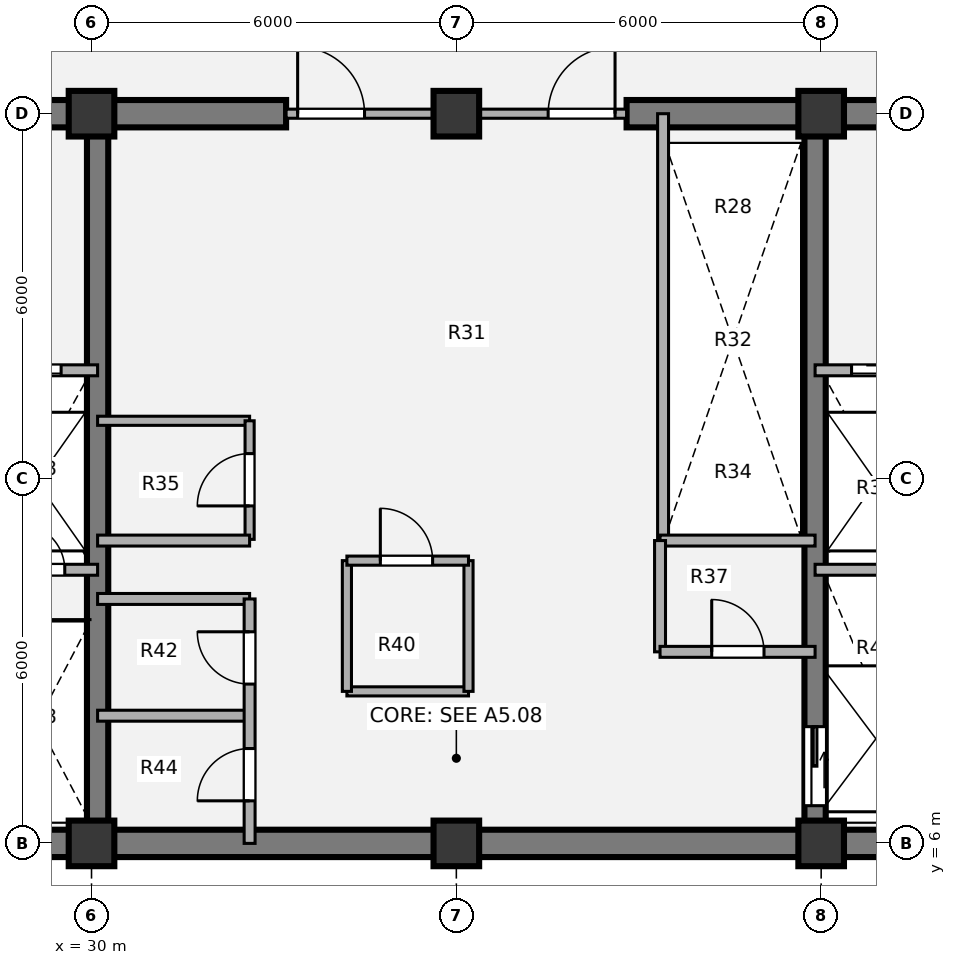
"""IFC4 building model, lengths in metres.
Left out: names, types, materials, properties, quantities, classifications, styles, units other than length and angle.
Written with IfcOpenShell. Run it as: python <this file> out.ifc"""

import sys

from ifc_helpers import new_model, si_unit, direction, frame, frame_2d, origin, origin_2d, place, context, subcontext, project, spatial, rectangle, extrude, source, transform, mapped, element, fill, save


model = new_model("IFC4")
c1 = context("Model", 3, precision=1e-05, world=origin(), true_north=direction((0.0, 1.0)))
c2 = subcontext(c1, "Body", "Model", "MODEL_VIEW")
j1 = project(units=[si_unit("LENGTHUNIT", "METRE"), si_unit("PLANEANGLEUNIT", "RADIAN")], contexts=[c1])
p1 = place(None, origin())
s1 = spatial("IfcSite", under=j1, at=p1, CompositionType="ELEMENT")
p2 = place(p1, origin())
s2 = spatial("IfcBuilding", under=s1, at=p2, CompositionType="ELEMENT")
p3 = place(p2, frame((0.0, 0.0, 167.76)))
s3 = spatial("IfcBuildingStorey", under=s2, at=p3, CompositionType="ELEMENT", Elevation=167.76)
m1 = source(origin(), c2, "Body", "SweptSolid", [
    extrude(rectangle(XDim=0.75, YDim=0.75, at=origin_2d()), origin(), (0.0, 0.0, 1.0), 3.78),
])
for number, where, z_axis, x_axis in (
    (1, (30.0, 6.0, 0.0), (0.0, 0.0, 1.0), (1.0, 0.0, 0.0)),
    (2, (36.0, 6.0, 0.0), (0.0, 0.0, 1.0), (1.0, 0.0, 0.0)),
    (3, (42.0, 6.0, 0.0), (0.0, 0.0, 1.0), (1.0, 0.0, 0.0)),
    (4, (30.0, 18.0, 0.0), (0.0, 0.0, 1.0), (1.0, 0.0, 0.0)),
    (5, (36.0, 18.0, 0.0), (0.0, 0.0, 1.0), (1.0, 0.0, 0.0)),
    (6, (42.0, 18.0, 0.0), (0.0, 0.0, 1.0), (1.0, 0.0, 0.0)),
):
    element("IfcColumn", number, at=place(p3, frame(where, z_axis=z_axis, x_axis=x_axis)), inside=s3, PredefinedType="COLUMN", context=c2, shape_type="MappedRepresentation", body=[
        mapped(m1, transform((0.0, 0.0, 0.0), x_axis=(1.0, 0.0, 0.0), y_axis=(0.0, 1.0, 0.0), z_axis=(0.0, 0.0, 1.0), scale=1.0)),
    ])
p4 = place(p3, frame((48.225, 6.0, 0.0), z_axis=(0.0, 0.0, 1.0), x_axis=(-1.0, 0.0, 0.0)))
e7 = element("IfcWall", 7, at=p4, inside=s3, PredefinedType="SHEAR", context=c2, shape_type="SweptSolid", body=[
    extrude(rectangle(XDim=24.45, YDim=0.45, at=frame_2d((12.225, 0.0))), origin(), (0.0, 0.0, 1.0), 3.78),
])
p5 = place(p3, frame((23.775, 18.0, 0.0), z_axis=(0.0, 0.0, 1.0), x_axis=(1.0, 0.0, 0.0)))
e8 = element("IfcWall", 8, at=p5, inside=s3, PredefinedType="SHEAR", context=c2, shape_type="SweptSolid", body=[
    extrude(rectangle(XDim=9.425, YDim=0.45, at=frame_2d((4.712, 0.0))), origin(), (0.0, 0.0, 1.0), 3.78),
])
p6 = place(p5, frame((2.95, 0.0, 0.0)))
e9 = element("IfcOpeningElement", 9, at=p6, cuts=e8, PredefinedType="OPENING", context=c2, shape_type="SweptSolid", body=[
    extrude(rectangle(XDim=1.1, YDim=2.1, at=origin_2d()), frame((0.55, 0.235, 1.05), z_axis=(0.0, -1.0, 0.0), x_axis=(1.0, 0.0, 0.0)), (0.0, 0.0, 1.0), 0.47),
])
p7 = place(p3, frame((38.8, 18.0, 0.0), z_axis=(0.0, 0.0, 1.0), x_axis=(1.0, 0.0, 0.0)))
e10 = element("IfcWall", 10, at=p7, inside=s3, PredefinedType="SHEAR", context=c2, shape_type="SweptSolid", body=[
    extrude(rectangle(XDim=9.425, YDim=0.45, at=frame_2d((4.712, 0.0))), origin(), (0.0, 0.0, 1.0), 3.78),
])
p8 = place(p7, frame((5.45, 0.0, 0.0)))
e11 = element("IfcOpeningElement", 11, at=p8, cuts=e10, PredefinedType="OPENING", context=c2, shape_type="SweptSolid", body=[
    extrude(rectangle(XDim=1.1, YDim=2.1, at=origin_2d()), frame((0.55, 0.235, 1.05), z_axis=(0.0, -1.0, 0.0), x_axis=(1.0, 0.0, 0.0)), (0.0, 0.0, 1.0), 0.47),
])
p9 = place(p3, frame((30.1, 6.0, 0.0), z_axis=(0.0, 0.0, 1.0), x_axis=(0.0, 1.0, 0.0)))
e12 = element("IfcWall", 12, at=p9, inside=s3, PredefinedType="SHEAR", context=c2, shape_type="SweptSolid", body=[
    extrude(rectangle(XDim=12.0, YDim=0.35, at=frame_2d((6.0, 0.0))), origin(), (0.0, 0.0, 1.0), 3.78),
])
p10 = place(p3, frame((41.9, 18.0, 0.0), z_axis=(0.0, 0.0, 1.0), x_axis=(0.0, -1.0, 0.0)))
e13 = element("IfcWall", 13, at=p10, inside=s3, PredefinedType="SHEAR", context=c2, shape_type="SweptSolid", body=[
    extrude(rectangle(XDim=12.0, YDim=0.35, at=frame_2d((6.0, 0.0))), origin(), (0.0, 0.0, 1.0), 3.78),
])
p11 = place(p10, frame((10.08, 0.0, 0.0)))
e14 = element("IfcOpeningElement", 14, at=p11, cuts=e13, PredefinedType="OPENING", context=c2, shape_type="SweptSolid", body=[
    extrude(rectangle(XDim=1.3, YDim=2.1, at=origin_2d()), frame((0.65, 0.185, 1.05), z_axis=(0.0, -1.0, 0.0), x_axis=(1.0, 0.0, 0.0)), (0.0, 0.0, 1.0), 0.37),
])
p12 = place(p3, frame((30.1, 12.95, 0.0), z_axis=(0.0, 0.0, 1.0), x_axis=(1.0, 0.0, 0.0)))
e15 = element("IfcWall", 15, at=p12, inside=s3, PredefinedType="PARTITIONING", context=c2, shape_type="SweptSolid", body=[
    extrude(rectangle(XDim=2.5, YDim=0.15, at=frame_2d((1.25, 0.0))), origin(), (0.0, 0.0, 1.0), 3.5),
])
p13 = place(p3, frame((32.6, 11.0, 0.0), z_axis=(0.0, 0.0, 1.0), x_axis=(0.0, 1.0, 0.0)))
e16 = element("IfcWall", 16, at=p13, inside=s3, PredefinedType="PARTITIONING", context=c2, shape_type="SweptSolid", body=[
    extrude(rectangle(XDim=1.95, YDim=0.15, at=frame_2d((0.975, 0.0))), origin(), (0.0, 0.0, 1.0), 3.5),
])
p14 = place(p13, frame((0.55, 0.0, 0.0)))
e17 = element("IfcOpeningElement", 17, at=p14, cuts=e16, PredefinedType="OPENING", context=c2, shape_type="SweptSolid", body=[
    extrude(rectangle(XDim=0.86, YDim=2.1, at=origin_2d()), frame((0.43, 0.085, 1.05), z_axis=(0.0, -1.0, 0.0), x_axis=(1.0, 0.0, 0.0)), (0.0, 0.0, 1.0), 0.17),
])
p15 = place(p3, frame((34.2, 8.5, 0.0), z_axis=(0.0, 0.0, 1.0), x_axis=(1.0, 0.0, 0.0)))
e18 = element("IfcWall", 18, at=p15, inside=s3, PredefinedType="PARTITIONING", context=c2, shape_type="SweptSolid", body=[
    extrude(rectangle(XDim=2.0, YDim=0.15, at=frame_2d((1.0, 0.0))), origin(), (0.0, 0.0, 1.0), 3.5),
])
p16 = place(p3, frame((34.2, 8.5, 0.0), z_axis=(0.0, 0.0, 1.0), x_axis=(0.0, 1.0, 0.0)))
e19 = element("IfcWall", 19, at=p16, inside=s3, PredefinedType="PARTITIONING", context=c2, shape_type="SweptSolid", body=[
    extrude(rectangle(XDim=2.15, YDim=0.15, at=frame_2d((1.075, 0.0))), origin(), (0.0, 0.0, 1.0), 3.5),
])
p17 = place(p3, frame((36.2, 8.5, 0.0), z_axis=(0.0, 0.0, 1.0), x_axis=(0.0, 1.0, 0.0)))
e20 = element("IfcWall", 20, at=p17, inside=s3, PredefinedType="PARTITIONING", context=c2, shape_type="SweptSolid", body=[
    extrude(rectangle(XDim=2.15, YDim=0.15, at=frame_2d((1.075, 0.0))), origin(), (0.0, 0.0, 1.0), 2.715),
])
p18 = place(p3, frame((34.2, 10.65, 0.0), z_axis=(0.0, 0.0, 1.0), x_axis=(1.0, 0.0, 0.0)))
e21 = element("IfcWall", 21, at=p18, inside=s3, PredefinedType="PARTITIONING", context=c2, shape_type="SweptSolid", body=[
    extrude(rectangle(XDim=2.0, YDim=0.15, at=frame_2d((1.0, 0.0))), origin(), (0.0, 0.0, 1.0), 3.5),
])
p19 = place(p18, frame((0.55, 0.0, 0.0)))
e22 = element("IfcOpeningElement", 22, at=p19, cuts=e21, PredefinedType="OPENING", context=c2, shape_type="SweptSolid", body=[
    extrude(rectangle(XDim=0.86, YDim=2.1, at=origin_2d()), frame((0.43, 0.085, 1.05), z_axis=(0.0, -1.0, 0.0), x_axis=(1.0, 0.0, 0.0)), (0.0, 0.0, 1.0), 0.17),
])
p20 = place(p3, frame((39.4, 11.0, 0.0), z_axis=(0.0, 0.0, 1.0), x_axis=(0.0, 1.0, 0.0)))
e23 = element("IfcWall", 23, at=p20, inside=s3, PredefinedType="PARTITIONING", context=c2, shape_type="SweptSolid", body=[
    extrude(rectangle(XDim=7.0, YDim=0.18, at=frame_2d((3.5, 0.0))), origin(), (0.0, 0.0, 1.0), 3.5),
])
p21 = place(p3, frame((30.1, 10.98, 0.0), z_axis=(0.0, 0.0, 1.0), x_axis=(1.0, 0.0, 0.0)))
e24 = element("IfcWall", 24, at=p21, inside=s3, PredefinedType="PARTITIONING", context=c2, shape_type="SweptSolid", body=[
    extrude(rectangle(XDim=2.5, YDim=0.18, at=frame_2d((1.25, 0.0))), origin(), (0.0, 0.0, 1.0), 3.5),
])
p22 = place(p3, frame((39.35, 10.98, 0.0), z_axis=(0.0, 0.0, 1.0), x_axis=(1.0, 0.0, 0.0)))
e25 = element("IfcWall", 25, at=p22, inside=s3, PredefinedType="PARTITIONING", context=c2, shape_type="SweptSolid", body=[
    extrude(rectangle(XDim=2.55, YDim=0.18, at=frame_2d((1.275, 0.0))), origin(), (0.0, 0.0, 1.0), 3.5),
])
for number, where, z_axis, x_axis in (
    (26, (30.1, 8.1, 0.0), (0.0, 0.0, 1.0), (1.0, 0.0, 0.0)),
    (27, (30.1, 10.02, 0.0), (0.0, 0.0, 1.0), (1.0, 0.0, 0.0)),
):
    element("IfcWall", number, at=place(p3, frame(where, z_axis=z_axis, x_axis=x_axis)), inside=s3, PredefinedType="PARTITIONING", context=c2, shape_type="SweptSolid", body=[
        extrude(rectangle(XDim=2.5, YDim=0.18, at=frame_2d((1.25, 0.0))), origin(), (0.0, 0.0, 1.0), 3.5),
    ])
p23 = place(p3, frame((32.6, 6.0, 0.0), z_axis=(0.0, 0.0, 1.0), x_axis=(0.0, 1.0, 0.0)))
e28 = element("IfcWall", 28, at=p23, inside=s3, PredefinedType="PARTITIONING", context=c2, shape_type="SweptSolid", body=[
    extrude(rectangle(XDim=4.02, YDim=0.18, at=frame_2d((2.01, 0.0))), origin(), (0.0, 0.0, 1.0), 3.5),
])
p24 = place(p23, frame((0.7, 0.0, 0.0)))
e29 = element("IfcOpeningElement", 29, at=p24, cuts=e28, PredefinedType="OPENING", context=c2, shape_type="SweptSolid", body=[
    extrude(rectangle(XDim=0.86, YDim=2.1, at=origin_2d()), frame((0.43, 0.1, 1.05), z_axis=(0.0, -1.0, 0.0), x_axis=(1.0, 0.0, 0.0)), (0.0, 0.0, 1.0), 0.2),
])
p25 = place(p23, frame((2.62, 0.0, 0.0)))
e30 = element("IfcOpeningElement", 30, at=p25, cuts=e28, PredefinedType="OPENING", context=c2, shape_type="SweptSolid", body=[
    extrude(rectangle(XDim=0.86, YDim=2.1, at=origin_2d()), frame((0.43, 0.1, 1.05), z_axis=(0.0, -1.0, 0.0), x_axis=(1.0, 0.0, 0.0)), (0.0, 0.0, 1.0), 0.2),
])
p26 = place(p3, frame((39.35, 9.15, 0.0), z_axis=(0.0, 0.0, 1.0), x_axis=(0.0, 1.0, 0.0)))
e31 = element("IfcWall", 31, at=p26, inside=s3, PredefinedType="PARTITIONING", context=c2, shape_type="SweptSolid", body=[
    extrude(rectangle(XDim=1.83, YDim=0.18, at=frame_2d((0.915, 0.0))), origin(), (0.0, 0.0, 1.0), 3.5),
])
p27 = place(p3, frame((39.35, 9.15, 0.0), z_axis=(0.0, 0.0, 1.0), x_axis=(1.0, 0.0, 0.0)))
e32 = element("IfcWall", 32, at=p27, inside=s3, PredefinedType="PARTITIONING", context=c2, shape_type="SweptSolid", body=[
    extrude(rectangle(XDim=2.55, YDim=0.18, at=frame_2d((1.275, 0.0))), origin(), (0.0, 0.0, 1.0), 3.5),
])
p28 = place(p27, frame((0.85, 0.0, 0.0)))
e33 = element("IfcOpeningElement", 33, at=p28, cuts=e32, PredefinedType="OPENING", context=c2, shape_type="SweptSolid", body=[
    extrude(rectangle(XDim=0.86, YDim=2.1, at=origin_2d()), frame((0.43, 0.1, 1.05), z_axis=(0.0, -1.0, 0.0), x_axis=(1.0, 0.0, 0.0)), (0.0, 0.0, 1.0), 0.2),
])
p29 = place(p3, frame((33.2, 18.0, 0.0), z_axis=(0.0, 0.0, 1.0), x_axis=(1.0, 0.0, 0.0)))
e34 = element("IfcWall", 34, at=p29, inside=s3, PredefinedType="PARTITIONING", context=c2, shape_type="SweptSolid", body=[
    extrude(rectangle(XDim=5.6, YDim=0.15, at=frame_2d((2.8, 0.0))), origin(), (0.0, 0.0, 1.0), 2.515),
])
p30 = place(p29, frame((0.19, 0.0, 0.0)))
e35 = element("IfcOpeningElement", 35, at=p30, cuts=e34, PredefinedType="OPENING", context=c2, shape_type="SweptSolid", body=[
    extrude(rectangle(XDim=1.1, YDim=2.1, at=origin_2d()), frame((0.55, 0.085, 1.05), z_axis=(0.0, -1.0, 0.0), x_axis=(1.0, 0.0, 0.0)), (0.0, 0.0, 1.0), 0.17),
])
p31 = place(p29, frame((4.31, 0.0, 0.0)))
e36 = element("IfcOpeningElement", 36, at=p31, cuts=e34, PredefinedType="OPENING", context=c2, shape_type="SweptSolid", body=[
    extrude(rectangle(XDim=1.1, YDim=2.1, at=origin_2d()), frame((0.55, 0.085, 1.05), z_axis=(0.0, -1.0, 0.0), x_axis=(1.0, 0.0, 0.0)), (0.0, 0.0, 1.0), 0.17),
])
p32 = place(p3, frame((24.0, 13.78, 0.0), z_axis=(0.0, 0.0, 1.0), x_axis=(1.0, 0.0, 0.0)))
e37 = element("IfcWall", 37, at=p32, inside=s3, PredefinedType="PARTITIONING", context=c2, shape_type="SweptSolid", body=[
    extrude(rectangle(XDim=6.1, YDim=0.18, at=frame_2d((3.05, 0.0))), origin(), (0.0, 0.0, 1.0), 3.5),
])
p33 = place(p32, frame((1.15, 0.0, 0.0)))
e38 = element("IfcOpeningElement", 38, at=p33, cuts=e37, PredefinedType="OPENING", context=c2, shape_type="SweptSolid", body=[
    extrude(rectangle(XDim=1.1, YDim=2.1, at=origin_2d()), frame((0.55, 0.1, 1.05), z_axis=(0.0, -1.0, 0.0), x_axis=(1.0, 0.0, 0.0)), (0.0, 0.0, 1.0), 0.2),
])
p34 = place(p32, frame((4.4, 0.0, 0.0)))
e39 = element("IfcOpeningElement", 39, at=p34, cuts=e37, PredefinedType="OPENING", context=c2, shape_type="SweptSolid", body=[
    extrude(rectangle(XDim=1.1, YDim=2.1, at=origin_2d()), frame((0.55, 0.1, 1.05), z_axis=(0.0, -1.0, 0.0), x_axis=(1.0, 0.0, 0.0)), (0.0, 0.0, 1.0), 0.2),
])
p35 = place(p3, frame((28.15, 10.5, 0.0), z_axis=(0.0, 0.0, 1.0), x_axis=(1.0, 0.0, 0.0)))
e40 = element("IfcWall", 40, at=p35, inside=s3, PredefinedType="PARTITIONING", context=c2, shape_type="SweptSolid", body=[
    extrude(rectangle(XDim=1.95, YDim=0.18, at=frame_2d((0.975, 0.0))), origin(), (0.0, 0.0, 1.0), 3.5),
])
p36 = place(p35, frame((0.65, 0.0, 0.0)))
e41 = element("IfcOpeningElement", 41, at=p36, cuts=e40, PredefinedType="OPENING", context=c2, shape_type="SweptSolid", body=[
    extrude(rectangle(XDim=0.76, YDim=2.05, at=origin_2d()), frame((0.38, 0.1, 1.025), z_axis=(0.0, -1.0, 0.0), x_axis=(1.0, 0.0, 0.0)), (0.0, 0.0, 1.0), 0.2),
])
p37 = place(p3, frame((41.9, 13.78, 0.0), z_axis=(0.0, 0.0, 1.0), x_axis=(1.0, 0.0, 0.0)))
e42 = element("IfcWall", 42, at=p37, inside=s3, PredefinedType="PARTITIONING", context=c2, shape_type="SweptSolid", body=[
    extrude(rectangle(XDim=6.1, YDim=0.18, at=frame_2d((3.05, 0.0))), origin(), (0.0, 0.0, 1.0), 3.5),
])
p38 = place(p37, frame((0.6, 0.0, 0.0)))
e43 = element("IfcOpeningElement", 43, at=p38, cuts=e42, PredefinedType="OPENING", context=c2, shape_type="SweptSolid", body=[
    extrude(rectangle(XDim=1.1, YDim=2.1, at=origin_2d()), frame((0.55, 0.1, 1.05), z_axis=(0.0, -1.0, 0.0), x_axis=(1.0, 0.0, 0.0)), (0.0, 0.0, 1.0), 0.2),
])
p39 = place(p37, frame((3.8, 0.0, 0.0)))
e44 = element("IfcOpeningElement", 44, at=p39, cuts=e42, PredefinedType="OPENING", context=c2, shape_type="SweptSolid", body=[
    extrude(rectangle(XDim=1.1, YDim=2.1, at=origin_2d()), frame((0.55, 0.1, 1.05), z_axis=(0.0, -1.0, 0.0), x_axis=(1.0, 0.0, 0.0)), (0.0, 0.0, 1.0), 0.2),
])
p40 = place(p3, frame((41.9, 10.5, 0.0), z_axis=(0.0, 0.0, 1.0), x_axis=(1.0, 0.0, 0.0)))
e45 = element("IfcWall", 45, at=p40, inside=s3, PredefinedType="PARTITIONING", context=c2, shape_type="SweptSolid", body=[
    extrude(rectangle(XDim=1.95, YDim=0.18, at=frame_2d((0.975, 0.0))), origin(), (0.0, 0.0, 1.0), 3.5),
])
m2 = source(origin(), c2, "Body", "SweptSolid", [
    extrude(rectangle(XDim=0.86, YDim=2.1, at=origin_2d()), frame((0.43, 0.025, 1.05), z_axis=(0.0, -1.0, 0.0), x_axis=(1.0, 0.0, 0.0)), (0.0, 0.0, 1.0), 0.05),
])
p41 = place(p14, origin())
e46 = element("IfcDoor", 46, at=p41, inside=s3, OperationType="SINGLE_SWING_LEFT", PredefinedType="DOOR", context=c2, shape_type="MappedRepresentation", body=[
    mapped(m2, transform((0.0, 0.0, 0.0), x_axis=(1.0, 0.0, 0.0), y_axis=(0.0, 1.0, 0.0), z_axis=(0.0, 0.0, 1.0), scale=1.0)),
])
fill(e17, e46)
p42 = place(p19, origin())
e47 = element("IfcDoor", 47, at=p42, inside=s3, OperationType="SINGLE_SWING_LEFT", PredefinedType="DOOR", context=c2, shape_type="MappedRepresentation", body=[
    mapped(m2, transform((0.0, 0.0, 0.0), x_axis=(1.0, 0.0, 0.0), y_axis=(0.0, 1.0, 0.0), z_axis=(0.0, 0.0, 1.0), scale=1.0)),
])
fill(e22, e47)
p43 = place(p24, origin())
e48 = element("IfcDoor", 48, at=p43, inside=s3, OperationType="SINGLE_SWING_LEFT", PredefinedType="DOOR", context=c2, shape_type="MappedRepresentation", body=[
    mapped(m2, transform((0.0, 0.0, 0.0), x_axis=(1.0, 0.0, 0.0), y_axis=(0.0, 1.0, 0.0), z_axis=(0.0, 0.0, 1.0), scale=1.0)),
])
fill(e29, e48)
p44 = place(p25, origin())
e49 = element("IfcDoor", 49, at=p44, inside=s3, OperationType="SINGLE_SWING_RIGHT", PredefinedType="DOOR", context=c2, shape_type="MappedRepresentation", body=[
    mapped(m2, transform((0.0, 0.0, 0.0), x_axis=(1.0, 0.0, 0.0), y_axis=(0.0, 1.0, 0.0), z_axis=(0.0, 0.0, 1.0), scale=1.0)),
])
fill(e30, e49)
p45 = place(p28, origin())
e50 = element("IfcDoor", 50, at=p45, inside=s3, OperationType="SINGLE_SWING_LEFT", PredefinedType="DOOR", context=c2, shape_type="MappedRepresentation", body=[
    mapped(m2, transform((0.0, 0.0, 0.0), x_axis=(1.0, 0.0, 0.0), y_axis=(0.0, 1.0, 0.0), z_axis=(0.0, 0.0, 1.0), scale=1.0)),
])
fill(e33, e50)
m3 = source(origin(), c2, "Body", "SweptSolid", [
    extrude(rectangle(XDim=1.1, YDim=2.1, at=origin_2d()), frame((0.55, 0.025, 1.05), z_axis=(0.0, -1.0, 0.0), x_axis=(1.0, 0.0, 0.0)), (0.0, 0.0, 1.0), 0.05),
])
p46 = place(p30, origin())
e51 = element("IfcDoor", 51, at=p46, inside=s3, OperationType="SINGLE_SWING_LEFT", PredefinedType="DOOR", context=c2, shape_type="MappedRepresentation", body=[
    mapped(m3, transform((0.0, 0.0, 0.0), x_axis=(1.0, 0.0, 0.0), y_axis=(0.0, 1.0, 0.0), z_axis=(0.0, 0.0, 1.0), scale=1.0)),
])
fill(e35, e51)
p47 = place(p31, origin())
e52 = element("IfcDoor", 52, at=p47, inside=s3, OperationType="SINGLE_SWING_RIGHT", PredefinedType="DOOR", context=c2, shape_type="MappedRepresentation", body=[
    mapped(m3, transform((0.0, 0.0, 0.0), x_axis=(1.0, 0.0, 0.0), y_axis=(0.0, 1.0, 0.0), z_axis=(0.0, 0.0, 1.0), scale=1.0)),
])
fill(e36, e52)
m4 = source(origin(), c2, "Body", "SweptSolid", [
    extrude(rectangle(XDim=1.1, YDim=2.1, at=origin_2d()), frame((0.55, 0.025, 1.05), z_axis=(0.0, -1.0, 0.0), x_axis=(1.0, 0.0, 0.0)), (0.0, 0.0, 1.0), 0.05),
])
p48 = place(p34, origin())
e53 = element("IfcDoor", 53, at=p48, inside=s3, OperationType="SLIDING_TO_LEFT", PredefinedType="DOOR", context=c2, shape_type="MappedRepresentation", body=[
    mapped(m4, transform((0.0, 0.0, 0.0), x_axis=(1.0, 0.0, 0.0), y_axis=(0.0, 1.0, 0.0), z_axis=(0.0, 0.0, 1.0), scale=1.0)),
])
fill(e39, e53)
m5 = source(origin(), c2, "Body", "SweptSolid", [
    extrude(rectangle(XDim=0.76, YDim=2.05, at=origin_2d()), frame((0.38, 0.025, 1.025), z_axis=(0.0, -1.0, 0.0), x_axis=(1.0, 0.0, 0.0)), (0.0, 0.0, 1.0), 0.05),
])
p49 = place(p36, origin())
e54 = element("IfcDoor", 54, at=p49, inside=s3, OperationType="SINGLE_SWING_LEFT", PredefinedType="DOOR", context=c2, shape_type="MappedRepresentation", body=[
    mapped(m5, transform((0.0, 0.0, 0.0), x_axis=(1.0, 0.0, 0.0), y_axis=(0.0, 1.0, 0.0), z_axis=(0.0, 0.0, 1.0), scale=1.0)),
])
fill(e41, e54)
p50 = place(p38, origin())
e55 = element("IfcDoor", 55, at=p50, inside=s3, OperationType="SLIDING_TO_RIGHT", PredefinedType="DOOR", context=c2, shape_type="MappedRepresentation", body=[
    mapped(m4, transform((0.0, 0.0, 0.0), x_axis=(1.0, 0.0, 0.0), y_axis=(0.0, 1.0, 0.0), z_axis=(0.0, 0.0, 1.0), scale=1.0)),
])
fill(e43, e55)
m6 = source(origin(), c2, "Body", "SweptSolid", [
    extrude(rectangle(XDim=1.3, YDim=2.1, at=origin_2d()), frame((0.65, 0.025, 1.05), z_axis=(0.0, -1.0, 0.0), x_axis=(1.0, 0.0, 0.0)), (0.0, 0.0, 1.0), 0.05),
])
p51 = place(p11, origin())
e56 = element("IfcDoor", 56, at=p51, inside=s3, OperationType="SLIDING_TO_LEFT", PredefinedType="DOOR", context=c2, shape_type="MappedRepresentation", body=[
    mapped(m6, transform((0.0, 0.0, 0.0), x_axis=(1.0, 0.0, 0.0), y_axis=(0.0, 1.0, 0.0), z_axis=(0.0, 0.0, 1.0), scale=1.0)),
])
fill(e14, e56)
save(model, sys.argv[1])
